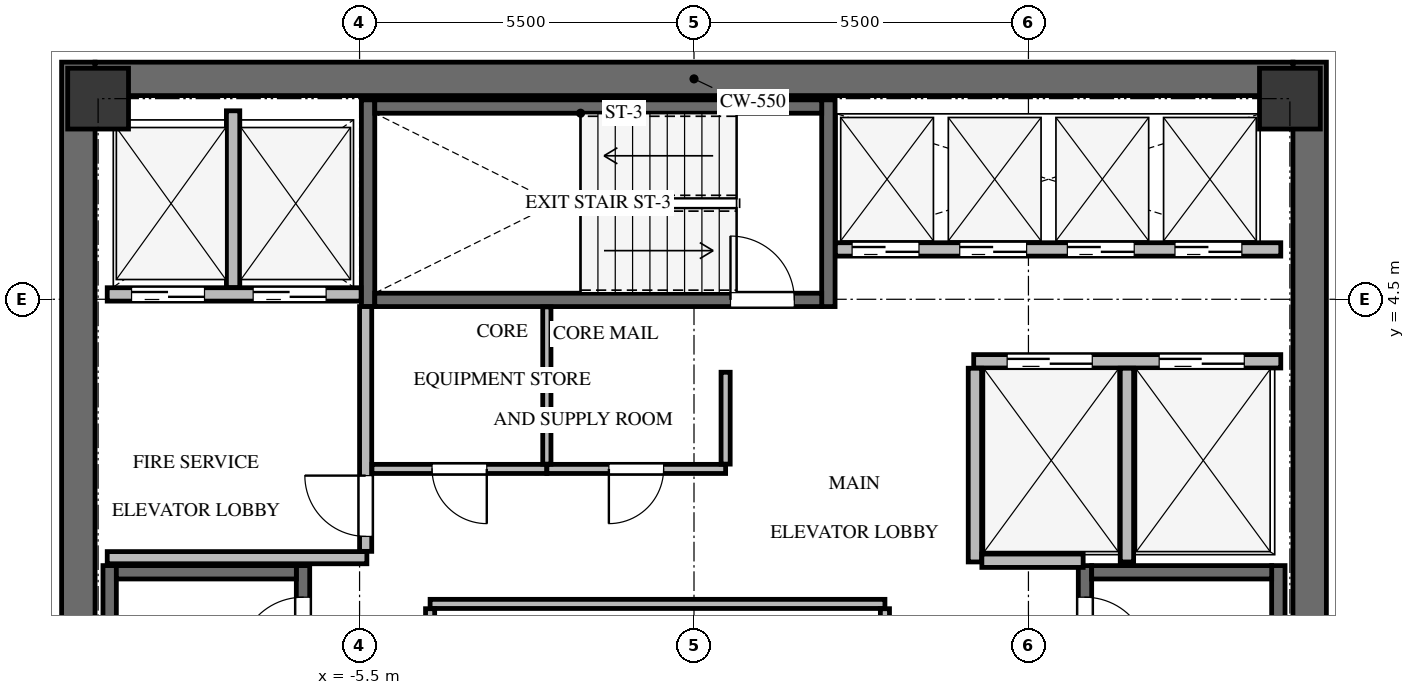
"""IFC4 building model, lengths in metres.
Left out: names, types, materials, properties, quantities, classifications, styles, units other than length and angle.
Written with IfcOpenShell. Run it as: python <this file> out.ifc"""

import sys

from ifc_helpers import new_model, si_unit, direction, frame, frame_2d, origin, origin_2d, place, context, subcontext, project, spatial, rectangle, extrude, source, transform, mapped, element, fill, save


model = new_model("IFC4")
c1 = context("Model", 3, precision=1e-05, world=origin(), true_north=direction((0.0, 1.0)))
c2 = subcontext(c1, "Body", "Model", "MODEL_VIEW")
j1 = project(units=[si_unit("LENGTHUNIT", "METRE"), si_unit("PLANEANGLEUNIT", "RADIAN")], contexts=[c1])
p1 = place(None, origin())
s1 = spatial("IfcSite", under=j1, at=p1, CompositionType="ELEMENT")
p2 = place(p1, origin())
s2 = spatial("IfcBuilding", under=s1, at=p2, CompositionType="ELEMENT")
p3 = place(p2, frame((0.0, 0.0, 241.4)))
s3 = spatial("IfcBuildingStorey", under=s2, at=p3, CompositionType="ELEMENT", Elevation=241.4)
for number, where, z_axis, x_axis in (
    (1, (-10.125, -8.4, 0.0), (0.0, 0.0, 1.0), (0.0, 1.0, 0.0)),
    (2, (10.125, -8.4, 0.0), (0.0, 0.0, 1.0), (0.0, 1.0, 0.0)),
):
    element("IfcWall", number, at=place(p3, frame(where, z_axis=z_axis, x_axis=x_axis)), inside=s3, PredefinedType="SHEAR", context=c2, shape_type="SweptSolid", body=[
        extrude(rectangle(XDim=16.8, YDim=0.55, at=frame_2d((8.4, 0.0))), origin(), (0.0, 0.0, 1.0), 3.3),
    ])
p4 = place(p3, frame((-9.85, 8.125, 0.0), z_axis=(0.0, 0.0, 1.0), x_axis=(1.0, 0.0, 0.0)))
e3 = element("IfcWall", 3, at=p4, inside=s3, PredefinedType="SHEAR", context=c2, shape_type="SweptSolid", body=[
    extrude(rectangle(XDim=19.7, YDim=0.55, at=frame_2d((9.85, 0.0))), origin(), (0.0, 0.0, 1.0), 3.3),
])
p5 = place(p3, frame((-6.43, -7.77, -0.24), z_axis=(0.0, 0.0, 1.0), x_axis=(0.0, 1.0, 0.0)))
e4 = element("IfcWall", 4, at=p5, inside=s3, PredefinedType="SHEAR", context=c2, shape_type="SweptSolid", body=[
    extrude(rectangle(XDim=7.89, YDim=0.22, at=frame_2d((3.945, 0.0))), origin(), (0.0, 0.0, 1.0), 3.3),
])
p6 = place(p5, frame((6.32, 0.0, 0.0)))
e5 = element("IfcOpeningElement", 5, at=p6, cuts=e4, PredefinedType="OPENING", context=c2, shape_type="SweptSolid", body=[
    extrude(rectangle(XDim=1.05, YDim=2.15, at=frame_2d((0.525, 1.075))), frame((0.0, 0.12, 0.0), z_axis=(0.0, -1.0, 0.0), x_axis=(1.0, 0.0, 0.0)), (0.0, 0.0, 1.0), 0.24),
])
p7 = place(p3, frame((-9.61, 0.12, -0.24), z_axis=(0.0, 0.0, 1.0), x_axis=(0.0, -1.0, 0.0)))
e6 = element("IfcWall", 6, at=p7, inside=s3, PredefinedType="SHEAR", context=c2, shape_type="SweptSolid", body=[
    extrude(rectangle(XDim=7.89, YDim=0.22, at=frame_2d((3.945, 0.0))), origin(), (0.0, 0.0, 1.0), 3.3),
])
p8 = place(p3, frame((-6.54, 0.01, -0.24), z_axis=(0.0, 0.0, 1.0), x_axis=(-1.0, 0.0, 0.0)))
e7 = element("IfcWall", 7, at=p8, inside=s3, PredefinedType="SHEAR", context=c2, shape_type="SweptSolid", body=[
    extrude(rectangle(XDim=2.96, YDim=0.22, at=frame_2d((1.48, 0.0))), origin(), (0.0, 0.0, 1.0), 3.3),
])
p9 = place(p3, frame((9.61, -7.77, -0.24), z_axis=(0.0, 0.0, 1.0), x_axis=(0.0, 1.0, 0.0)))
e8 = element("IfcWall", 8, at=p9, inside=s3, PredefinedType="SHEAR", context=c2, shape_type="SweptSolid", body=[
    extrude(rectangle(XDim=7.89, YDim=0.22, at=frame_2d((3.945, 0.0))), origin(), (0.0, 0.0, 1.0), 3.3),
])
p10 = place(p3, frame((6.43, 0.12, -0.24), z_axis=(0.0, 0.0, 1.0), x_axis=(0.0, -1.0, 0.0)))
e9 = element("IfcWall", 9, at=p10, inside=s3, PredefinedType="SHEAR", context=c2, shape_type="SweptSolid", body=[
    extrude(rectangle(XDim=7.89, YDim=0.22, at=frame_2d((3.945, 0.0))), origin(), (0.0, 0.0, 1.0), 3.3),
])
p11 = place(p10, frame((0.52, 0.0, 0.0)))
e10 = element("IfcOpeningElement", 10, at=p11, cuts=e9, PredefinedType="OPENING", context=c2, shape_type="SweptSolid", body=[
    extrude(rectangle(XDim=1.05, YDim=2.15, at=frame_2d((0.525, 1.075))), frame((0.0, 0.12, 0.0), z_axis=(0.0, -1.0, 0.0), x_axis=(1.0, 0.0, 0.0)), (0.0, 0.0, 1.0), 0.24),
])
p12 = place(p3, frame((9.5, 0.01, -0.24), z_axis=(0.0, 0.0, 1.0), x_axis=(-1.0, 0.0, 0.0)))
e11 = element("IfcWall", 11, at=p12, inside=s3, PredefinedType="SHEAR", context=c2, shape_type="SweptSolid", body=[
    extrude(rectangle(XDim=2.96, YDim=0.22, at=frame_2d((1.48, 0.0))), origin(), (0.0, 0.0, 1.0), 3.3),
])
for number, where, z_axis, x_axis in (
    (12, (2.21, 4.38, -0.24), (0.0, 0.0, 1.0), (0.0, 1.0, 0.0)),
    (13, (-5.36, 7.78, -0.24), (0.0, 0.0, 1.0), (0.0, -1.0, 0.0)),
):
    element("IfcWall", number, at=place(p3, frame(where, z_axis=z_axis, x_axis=x_axis)), inside=s3, PredefinedType="SHEAR", context=c2, shape_type="SweptSolid", body=[
        extrude(rectangle(XDim=3.4, YDim=0.22, at=frame_2d((1.7, 0.0))), origin(), (0.0, 0.0, 1.0), 3.3),
    ])
p13 = place(p3, frame((-5.25, 4.49, -0.24), z_axis=(0.0, 0.0, 1.0), x_axis=(1.0, 0.0, 0.0)))
e14 = element("IfcWall", 14, at=p13, inside=s3, PredefinedType="SHEAR", context=c2, shape_type="SweptSolid", body=[
    extrude(rectangle(XDim=7.35, YDim=0.22, at=frame_2d((3.675, 0.0))), origin(), (0.0, 0.0, 1.0), 3.3),
])
p14 = place(p13, frame((5.85, 0.0, 0.0)))
e15 = element("IfcOpeningElement", 15, at=p14, cuts=e14, PredefinedType="OPENING", context=c2, shape_type="SweptSolid", body=[
    extrude(rectangle(XDim=1.05, YDim=2.15, at=frame_2d((0.525, 1.075))), frame((0.0, 0.12, 0.0), z_axis=(0.0, -1.0, 0.0), x_axis=(1.0, 0.0, 0.0)), (0.0, 0.0, 1.0), 0.24),
])
p15 = place(p3, frame((2.1, 7.67, -0.24), z_axis=(0.0, 0.0, 1.0), x_axis=(-1.0, 0.0, 0.0)))
e16 = element("IfcWall", 16, at=p15, inside=s3, PredefinedType="SHEAR", context=c2, shape_type="SweptSolid", body=[
    extrude(rectangle(XDim=7.35, YDim=0.22, at=frame_2d((3.675, 0.0))), origin(), (0.0, 0.0, 1.0), 3.3),
])
m1 = source(origin(), c2, "Body", "SweptSolid", [
    extrude(rectangle(XDim=1.0, YDim=1.0, at=origin_2d()), origin(), (0.0, 0.0, 1.0), 3.3),
])
for number, where, z_axis, x_axis in (
    (17, (9.8, 7.8, -0.24), (0.0, 0.0, 1.0), (1.0, 0.0, 0.0)),
    (18, (-9.8, 7.8, -0.24), (0.0, 0.0, 1.0), (1.0, 0.0, 0.0)),
):
    element("IfcColumn", number, at=place(p3, frame(where, z_axis=z_axis, x_axis=x_axis)), inside=s3, PredefinedType="COLUMN", context=c2, shape_type="MappedRepresentation", body=[
        mapped(m1, transform((0.0, 0.0, 0.0), x_axis=(1.0, 0.0, 0.0), y_axis=(0.0, 1.0, 0.0), z_axis=(0.0, 0.0, 1.0), scale=1.0)),
    ])
p16 = place(p3, frame((-9.65, 4.58, 0.0), z_axis=(0.0, 0.0, 1.0), x_axis=(1.0, 0.0, 0.0)))
e19 = element("IfcWall", 19, at=p16, inside=s3, PredefinedType="SOLIDWALL", context=c2, shape_type="SweptSolid", body=[
    extrude(rectangle(XDim=4.175, YDim=0.22, at=frame_2d((2.087, 0.0))), origin(), (0.0, 0.0, 1.0), 3.045),
])
p17 = place(p16, frame((0.4, 0.0, 0.0)))
e20 = element("IfcOpeningElement", 20, at=p17, cuts=e19, PredefinedType="OPENING", context=c2, shape_type="SweptSolid", body=[
    extrude(rectangle(XDim=1.2, YDim=2.15, at=frame_2d((0.6, 1.075))), frame((0.0, 0.12, 0.0), z_axis=(0.0, -1.0, 0.0), x_axis=(1.0, 0.0, 0.0)), (0.0, 0.0, 1.0), 0.24),
])
p18 = place(p16, frame((2.4, 0.0, 0.0)))
e21 = element("IfcOpeningElement", 21, at=p18, cuts=e19, PredefinedType="OPENING", context=c2, shape_type="SweptSolid", body=[
    extrude(rectangle(XDim=1.2, YDim=2.15, at=frame_2d((0.6, 1.075))), frame((0.0, 0.12, 0.0), z_axis=(0.0, -1.0, 0.0), x_axis=(1.0, 0.0, 0.0)), (0.0, 0.0, 1.0), 0.24),
])
p19 = place(p3, frame((-7.58, 4.694, 0.0), z_axis=(0.0, 0.0, 1.0), x_axis=(0.0, 1.0, 0.0)))
e22 = element("IfcWall", 22, at=p19, inside=s3, PredefinedType="SOLIDWALL", context=c2, shape_type="SweptSolid", body=[
    extrude(rectangle(XDim=2.906, YDim=0.22, at=frame_2d((1.453, 0.0))), origin(), (0.0, 0.0, 1.0), 3.045),
])
p20 = place(p3, frame((-9.65, 0.25, 0.0), z_axis=(0.0, 0.0, 1.0), x_axis=(1.0, 0.0, 0.0)))
e23 = element("IfcWall", 23, at=p20, inside=s3, PredefinedType="SOLIDWALL", context=c2, shape_type="SweptSolid", body=[
    extrude(rectangle(XDim=4.27, YDim=0.2, at=frame_2d((2.135, 0.0))), origin(), (0.0, 0.0, 1.0), 3.045),
])
p21 = place(p3, frame((-5.4, 0.354, 0.0), z_axis=(0.0, 0.0, 1.0), x_axis=(0.0, 1.0, 0.0)))
e24 = element("IfcWall", 24, at=p21, inside=s3, PredefinedType="SOLIDWALL", context=c2, shape_type="SweptSolid", body=[
    extrude(rectangle(XDim=4.026, YDim=0.2, at=frame_2d((2.013, 0.0))), origin(), (0.0, 0.0, 1.0), 3.045),
])
p22 = place(p21, frame((0.246, 0.0, 0.0)))
e25 = element("IfcOpeningElement", 25, at=p22, cuts=e24, PredefinedType="OPENING", context=c2, shape_type="SweptSolid", body=[
    extrude(rectangle(XDim=1.0, YDim=2.15, at=frame_2d((0.5, 1.075))), frame((0.0, 0.11, 0.0), z_axis=(0.0, -1.0, 0.0), x_axis=(1.0, 0.0, 0.0)), (0.0, 0.0, 1.0), 0.22),
])
p23 = place(p3, frame((4.6, 3.48, 0.0), z_axis=(0.0, 0.0, 1.0), x_axis=(1.0, 0.0, 0.0)))
e26 = element("IfcWall", 26, at=p23, inside=s3, PredefinedType="SOLIDWALL", context=c2, shape_type="SweptSolid", body=[
    extrude(rectangle(XDim=5.05, YDim=0.22, at=frame_2d((2.525, 0.0))), origin(), (0.0, 0.0, 1.0), 3.045),
])
p24 = place(p23, frame((0.55, 0.0, 0.0)))
e27 = element("IfcOpeningElement", 27, at=p24, cuts=e26, PredefinedType="OPENING", context=c2, shape_type="SweptSolid", body=[
    extrude(rectangle(XDim=1.4, YDim=2.15, at=frame_2d((0.7, 1.075))), frame((0.0, 0.12, 0.0), z_axis=(0.0, -1.0, 0.0), x_axis=(1.0, 0.0, 0.0)), (0.0, 0.0, 1.0), 0.24),
])
p25 = place(p23, frame((3.05, 0.0, 0.0)))
e28 = element("IfcOpeningElement", 28, at=p25, cuts=e26, PredefinedType="OPENING", context=c2, shape_type="SweptSolid", body=[
    extrude(rectangle(XDim=1.4, YDim=2.15, at=frame_2d((0.7, 1.075))), frame((0.0, 0.12, 0.0), z_axis=(0.0, -1.0, 0.0), x_axis=(1.0, 0.0, 0.0)), (0.0, 0.0, 1.0), 0.24),
])
for number, where, z_axis, x_axis in (
    (29, (4.62, 0.18, 0.0), (0.0, 0.0, 1.0), (0.0, 1.0, 0.0)),
    (30, (7.12, 0.18, 0.0), (0.0, 0.0, 1.0), (0.0, 1.0, 0.0)),
):
    element("IfcWall", number, at=place(p3, frame(where, z_axis=z_axis, x_axis=x_axis)), inside=s3, PredefinedType="SOLIDWALL", context=c2, shape_type="SweptSolid", body=[
        extrude(rectangle(XDim=3.186, YDim=0.22, at=frame_2d((1.593, 0.0))), origin(), (0.0, 0.0, 1.0), 3.045),
    ])
p26 = place(p3, frame((4.734, 0.2, 0.0), z_axis=(0.0, 0.0, 1.0), x_axis=(1.0, 0.0, 0.0)))
e31 = element("IfcWall", 31, at=p26, inside=s3, PredefinedType="SOLIDWALL", context=c2, shape_type="SweptSolid", body=[
    extrude(rectangle(XDim=1.666, YDim=0.22, at=frame_2d((0.833, 0.0))), origin(), (0.0, 0.0, 1.0), 3.045),
])
p27 = place(p3, frame((2.325, 5.32, 0.0), z_axis=(0.0, 0.0, 1.0), x_axis=(1.0, 0.0, 0.0)))
e32 = element("IfcWall", 32, at=p27, inside=s3, PredefinedType="SOLIDWALL", context=c2, shape_type="SweptSolid", body=[
    extrude(rectangle(XDim=7.325, YDim=0.22, at=frame_2d((3.663, 0.0))), origin(), (0.0, 0.0, 1.0), 3.045),
])
p28 = place(p27, frame((0.275, 0.0, 0.0)))
e33 = element("IfcOpeningElement", 33, at=p28, cuts=e32, PredefinedType="OPENING", context=c2, shape_type="SweptSolid", body=[
    extrude(rectangle(XDim=1.1, YDim=2.15, at=frame_2d((0.55, 1.075))), frame((0.0, 0.12, 0.0), z_axis=(0.0, -1.0, 0.0), x_axis=(1.0, 0.0, 0.0)), (0.0, 0.0, 1.0), 0.24),
])
p29 = place(p27, frame((2.045, 0.0, 0.0)))
e34 = element("IfcOpeningElement", 34, at=p29, cuts=e32, PredefinedType="OPENING", context=c2, shape_type="SweptSolid", body=[
    extrude(rectangle(XDim=1.1, YDim=2.15, at=frame_2d((0.55, 1.075))), frame((0.0, 0.12, 0.0), z_axis=(0.0, -1.0, 0.0), x_axis=(1.0, 0.0, 0.0)), (0.0, 0.0, 1.0), 0.24),
])
p30 = place(p27, frame((3.815, 0.0, 0.0)))
e35 = element("IfcOpeningElement", 35, at=p30, cuts=e32, PredefinedType="OPENING", context=c2, shape_type="SweptSolid", body=[
    extrude(rectangle(XDim=1.1, YDim=2.15, at=frame_2d((0.55, 1.075))), frame((0.0, 0.12, 0.0), z_axis=(0.0, -1.0, 0.0), x_axis=(1.0, 0.0, 0.0)), (0.0, 0.0, 1.0), 0.24),
])
p31 = place(p27, frame((5.585, 0.0, 0.0)))
e36 = element("IfcOpeningElement", 36, at=p31, cuts=e32, PredefinedType="OPENING", context=c2, shape_type="SweptSolid", body=[
    extrude(rectangle(XDim=1.1, YDim=2.15, at=frame_2d((0.55, 1.075))), frame((0.0, 0.12, 0.0), z_axis=(0.0, -1.0, 0.0), x_axis=(1.0, 0.0, 0.0)), (0.0, 0.0, 1.0), 0.24),
])
p32 = place(p3, frame((-4.34, -0.51, 0.0), z_axis=(0.0, 0.0, 1.0), x_axis=(1.0, 0.0, 0.0)))
e37 = element("IfcWall", 37, at=p32, inside=s3, PredefinedType="PARTITIONING", context=c2, shape_type="SweptSolid", body=[
    extrude(rectangle(XDim=7.48, YDim=0.15, at=frame_2d((3.74, 0.0))), origin(), (0.0, 0.0, 1.0), 3.045),
])
for number, where, z_axis, x_axis in (
    (38, (-4.34, -2.961, 0.0), (0.0, 0.0, 1.0), (0.0, 1.0, 0.0)),
    (39, (3.14, -0.589, 0.0), (0.0, 0.0, 1.0), (0.0, -1.0, 0.0)),
):
    element("IfcWall", number, at=place(p3, frame(where, z_axis=z_axis, x_axis=x_axis)), inside=s3, PredefinedType="PARTITIONING", context=c2, shape_type="SweptSolid", body=[
        extrude(rectangle(XDim=2.372, YDim=0.15, at=frame_2d((1.186, 0.0))), origin(), (0.0, 0.0, 1.0), 3.045),
    ])
p33 = place(p3, frame((-2.42, 1.71, 0.0), z_axis=(0.0, 0.0, 1.0), x_axis=(-1.0, 0.0, 0.0)))
e40 = element("IfcWall", 40, at=p33, inside=s3, PredefinedType="PARTITIONING", context=c2, shape_type="SweptSolid", body=[
    extrude(rectangle(XDim=2.876, YDim=0.15, at=frame_2d((1.438, 0.0))), origin(), (0.0, 0.0, 1.0), 3.045),
])
p34 = place(p33, frame((0.988, 0.0, 0.0)))
e41 = element("IfcOpeningElement", 41, at=p34, cuts=e40, PredefinedType="OPENING", context=c2, shape_type="SweptSolid", body=[
    extrude(rectangle(XDim=0.9, YDim=2.05, at=frame_2d((0.45, 1.025))), frame((0.0, 0.085, 0.0), z_axis=(0.0, -1.0, 0.0), x_axis=(1.0, 0.0, 0.0)), (0.0, 0.0, 1.0), 0.17),
])
p35 = place(p3, frame((0.52, 1.71, 0.0), z_axis=(0.0, 0.0, 1.0), x_axis=(-1.0, 0.0, 0.0)))
e42 = element("IfcWall", 42, at=p35, inside=s3, PredefinedType="PARTITIONING", context=c2, shape_type="SweptSolid", body=[
    extrude(rectangle(XDim=2.94, YDim=0.15, at=frame_2d((1.47, 0.0))), origin(), (0.0, 0.0, 1.0), 3.045),
])
p36 = place(p35, frame((1.02, 0.0, 0.0)))
e43 = element("IfcOpeningElement", 43, at=p36, cuts=e42, PredefinedType="OPENING", context=c2, shape_type="SweptSolid", body=[
    extrude(rectangle(XDim=0.9, YDim=2.05, at=frame_2d((0.45, 1.025))), frame((0.0, 0.085, 0.0), z_axis=(0.0, -1.0, 0.0), x_axis=(1.0, 0.0, 0.0)), (0.0, 0.0, 1.0), 0.17),
])
p37 = place(p3, frame((0.52, 3.3, 0.0), z_axis=(0.0, 0.0, 1.0), x_axis=(0.0, -1.0, 0.0)))
e44 = element("IfcWall", 44, at=p37, inside=s3, PredefinedType="PARTITIONING", context=c2, shape_type="SweptSolid", body=[
    extrude(rectangle(XDim=1.511, YDim=0.15, at=frame_2d((0.755, 0.0))), origin(), (0.0, 0.0, 1.0), 3.045),
])
p38 = place(p3, frame((-2.42, 4.375, 0.0), z_axis=(0.0, 0.0, 1.0), x_axis=(0.0, -1.0, 0.0)))
e45 = element("IfcWall", 45, at=p38, inside=s3, PredefinedType="PARTITIONING", context=c2, shape_type="SweptSolid", body=[
    extrude(rectangle(XDim=2.586, YDim=0.135, at=frame_2d((1.293, 0.0))), origin(), (0.0, 0.0, 1.0), 3.045),
])
m2 = source(origin(), c2, "Body", "SweptSolid", [
    extrude(rectangle(XDim=1.05, YDim=2.15, at=frame_2d((0.525, 1.075))), frame((0.0, 0.025, 0.0), z_axis=(0.0, -1.0, 0.0), x_axis=(1.0, 0.0, 0.0)), (0.0, 0.0, 1.0), 0.05),
])
p39 = place(p6, origin())
e46 = element("IfcDoor", 46, at=p39, inside=s3, OperationType="SINGLE_SWING_LEFT", PredefinedType="DOOR", context=c2, shape_type="MappedRepresentation", body=[
    mapped(m2, transform((0.0, 0.0, 0.0), x_axis=(1.0, 0.0, 0.0), y_axis=(0.0, 1.0, 0.0), z_axis=(0.0, 0.0, 1.0), scale=1.0)),
])
fill(e5, e46)
m3 = source(origin(), c2, "Body", "SweptSolid", [
    extrude(rectangle(XDim=1.05, YDim=2.15, at=frame_2d((0.525, 1.075))), frame((0.0, 0.025, 0.0), z_axis=(0.0, -1.0, 0.0), x_axis=(1.0, 0.0, 0.0)), (0.0, 0.0, 1.0), 0.05),
])
p40 = place(p11, origin())
e47 = element("IfcDoor", 47, at=p40, inside=s3, OperationType="SINGLE_SWING_RIGHT", PredefinedType="DOOR", context=c2, shape_type="MappedRepresentation", body=[
    mapped(m3, transform((0.0, 0.0, 0.0), x_axis=(1.0, 0.0, 0.0), y_axis=(0.0, 1.0, 0.0), z_axis=(0.0, 0.0, 1.0), scale=1.0)),
])
fill(e10, e47)
p41 = place(p14, origin())
e48 = element("IfcDoor", 48, at=p41, inside=s3, OperationType="SINGLE_SWING_LEFT", PredefinedType="DOOR", context=c2, shape_type="MappedRepresentation", body=[
    mapped(m2, transform((0.0, 0.0, 0.0), x_axis=(1.0, 0.0, 0.0), y_axis=(0.0, 1.0, 0.0), z_axis=(0.0, 0.0, 1.0), scale=1.0)),
])
fill(e15, e48)
m4 = source(origin(), c2, "Body", "SweptSolid", [
    extrude(rectangle(XDim=1.2, YDim=2.15, at=frame_2d((0.6, 1.075))), frame((0.0, 0.025, 0.0), z_axis=(0.0, -1.0, 0.0), x_axis=(1.0, 0.0, 0.0)), (0.0, 0.0, 1.0), 0.05),
])
p42 = place(p17, origin())
e49 = element("IfcDoor", 49, at=p42, inside=s3, OperationType="DOUBLE_DOOR_SLIDING", PredefinedType="DOOR", context=c2, shape_type="MappedRepresentation", body=[
    mapped(m4, transform((0.0, 0.0, 0.0), x_axis=(1.0, 0.0, 0.0), y_axis=(0.0, 1.0, 0.0), z_axis=(0.0, 0.0, 1.0), scale=1.0)),
])
fill(e20, e49)
p43 = place(p18, origin())
e50 = element("IfcDoor", 50, at=p43, inside=s3, OperationType="DOUBLE_DOOR_SLIDING", PredefinedType="DOOR", context=c2, shape_type="MappedRepresentation", body=[
    mapped(m4, transform((0.0, 0.0, 0.0), x_axis=(1.0, 0.0, 0.0), y_axis=(0.0, 1.0, 0.0), z_axis=(0.0, 0.0, 1.0), scale=1.0)),
])
fill(e21, e50)
m5 = source(origin(), c2, "Body", "SweptSolid", [
    extrude(rectangle(XDim=1.0, YDim=2.15, at=frame_2d((0.5, 1.075))), frame((0.0, 0.025, 0.0), z_axis=(0.0, -1.0, 0.0), x_axis=(1.0, 0.0, 0.0)), (0.0, 0.0, 1.0), 0.05),
])
p44 = place(p22, origin())
e51 = element("IfcDoor", 51, at=p44, inside=s3, OperationType="SINGLE_SWING_RIGHT", PredefinedType="DOOR", context=c2, shape_type="MappedRepresentation", body=[
    mapped(m5, transform((0.0, 0.0, 0.0), x_axis=(1.0, 0.0, 0.0), y_axis=(0.0, 1.0, 0.0), z_axis=(0.0, 0.0, 1.0), scale=1.0)),
])
fill(e25, e51)
m6 = source(origin(), c2, "Body", "SweptSolid", [
    extrude(rectangle(XDim=1.4, YDim=2.15, at=frame_2d((0.7, 1.075))), frame((0.0, 0.025, 0.0), z_axis=(0.0, -1.0, 0.0), x_axis=(1.0, 0.0, 0.0)), (0.0, 0.0, 1.0), 0.05),
])
p45 = place(p24, origin())
e52 = element("IfcDoor", 52, at=p45, inside=s3, OperationType="DOUBLE_DOOR_SLIDING", PredefinedType="DOOR", context=c2, shape_type="MappedRepresentation", body=[
    mapped(m6, transform((0.0, 0.0, 0.0), x_axis=(1.0, 0.0, 0.0), y_axis=(0.0, 1.0, 0.0), z_axis=(0.0, 0.0, 1.0), scale=1.0)),
])
fill(e27, e52)
p46 = place(p25, origin())
e53 = element("IfcDoor", 53, at=p46, inside=s3, OperationType="DOUBLE_DOOR_SLIDING", PredefinedType="DOOR", context=c2, shape_type="MappedRepresentation", body=[
    mapped(m6, transform((0.0, 0.0, 0.0), x_axis=(1.0, 0.0, 0.0), y_axis=(0.0, 1.0, 0.0), z_axis=(0.0, 0.0, 1.0), scale=1.0)),
])
fill(e28, e53)
m7 = source(origin(), c2, "Body", "SweptSolid", [
    extrude(rectangle(XDim=1.1, YDim=2.15, at=frame_2d((0.55, 1.075))), frame((0.0, 0.025, 0.0), z_axis=(0.0, -1.0, 0.0), x_axis=(1.0, 0.0, 0.0)), (0.0, 0.0, 1.0), 0.05),
])
p47 = place(p28, origin())
e54 = element("IfcDoor", 54, at=p47, inside=s3, OperationType="DOUBLE_DOOR_SLIDING", PredefinedType="DOOR", context=c2, shape_type="MappedRepresentation", body=[
    mapped(m7, transform((0.0, 0.0, 0.0), x_axis=(1.0, 0.0, 0.0), y_axis=(0.0, 1.0, 0.0), z_axis=(0.0, 0.0, 1.0), scale=1.0)),
])
fill(e33, e54)
p48 = place(p29, origin())
e55 = element("IfcDoor", 55, at=p48, inside=s3, OperationType="DOUBLE_DOOR_SLIDING", PredefinedType="DOOR", context=c2, shape_type="MappedRepresentation", body=[
    mapped(m7, transform((0.0, 0.0, 0.0), x_axis=(1.0, 0.0, 0.0), y_axis=(0.0, 1.0, 0.0), z_axis=(0.0, 0.0, 1.0), scale=1.0)),
])
fill(e34, e55)
p49 = place(p30, origin())
e56 = element("IfcDoor", 56, at=p49, inside=s3, OperationType="DOUBLE_DOOR_SLIDING", PredefinedType="DOOR", context=c2, shape_type="MappedRepresentation", body=[
    mapped(m7, transform((0.0, 0.0, 0.0), x_axis=(1.0, 0.0, 0.0), y_axis=(0.0, 1.0, 0.0), z_axis=(0.0, 0.0, 1.0), scale=1.0)),
])
fill(e35, e56)
p50 = place(p31, origin())
e57 = element("IfcDoor", 57, at=p50, inside=s3, OperationType="DOUBLE_DOOR_SLIDING", PredefinedType="DOOR", context=c2, shape_type="MappedRepresentation", body=[
    mapped(m7, transform((0.0, 0.0, 0.0), x_axis=(1.0, 0.0, 0.0), y_axis=(0.0, 1.0, 0.0), z_axis=(0.0, 0.0, 1.0), scale=1.0)),
])
fill(e36, e57)
m8 = source(origin(), c2, "Body", "SweptSolid", [
    extrude(rectangle(XDim=0.9, YDim=2.05, at=frame_2d((0.45, 1.025))), frame((0.0, 0.025, 0.0), z_axis=(0.0, -1.0, 0.0), x_axis=(1.0, 0.0, 0.0)), (0.0, 0.0, 1.0), 0.05),
])
p51 = place(p34, origin())
e58 = element("IfcDoor", 58, at=p51, inside=s3, OperationType="SINGLE_SWING_LEFT", PredefinedType="DOOR", context=c2, shape_type="MappedRepresentation", body=[
    mapped(m8, transform((0.0, 0.0, 0.0), x_axis=(1.0, 0.0, 0.0), y_axis=(0.0, 1.0, 0.0), z_axis=(0.0, 0.0, 1.0), scale=1.0)),
])
fill(e41, e58)
m9 = source(origin(), c2, "Body", "SweptSolid", [
    extrude(rectangle(XDim=0.9, YDim=2.05, at=frame_2d((0.45, 1.025))), frame((0.0, 0.025, 0.0), z_axis=(0.0, -1.0, 0.0), x_axis=(1.0, 0.0, 0.0)), (0.0, 0.0, 1.0), 0.05),
])
p52 = place(p36, origin())
e59 = element("IfcDoor", 59, at=p52, inside=s3, OperationType="SINGLE_SWING_RIGHT", PredefinedType="DOOR", context=c2, shape_type="MappedRepresentation", body=[
    mapped(m9, transform((0.0, 0.0, 0.0), x_axis=(1.0, 0.0, 0.0), y_axis=(0.0, 1.0, 0.0), z_axis=(0.0, 0.0, 1.0), scale=1.0)),
])
fill(e43, e59)
save(model, sys.argv[1])
